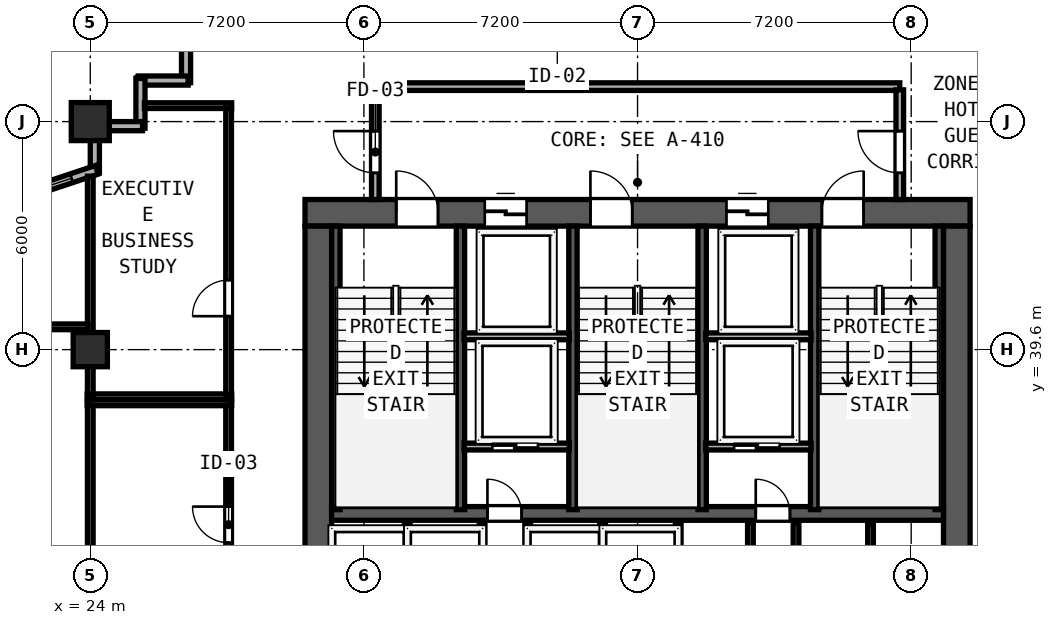
"""IFC4 building model, lengths in metres.
Left out: names, types, materials, properties, quantities, classifications, styles, units other than length and angle.
Written with IfcOpenShell. Run it as: python <this file> out.ifc"""

import sys

from ifc_helpers import new_model, si_unit, direction, frame, frame_2d, origin, origin_2d, place, context, subcontext, project, spatial, rectangle, hollow_rectangle, extrude, element, fill, save


model = new_model("IFC4")
c1 = context("Model", 3, precision=1e-05, world=origin(), true_north=direction((0.0, 1.0)))
c2 = subcontext(c1, "Body", "Model", "MODEL_VIEW")
j1 = project(units=[si_unit("LENGTHUNIT", "METRE"), si_unit("PLANEANGLEUNIT", "RADIAN")], contexts=[c1])
p1 = place(None, origin())
s1 = spatial("IfcSite", under=j1, at=p1, CompositionType="ELEMENT")
p2 = place(p1, origin())
s2 = spatial("IfcBuilding", under=s1, at=p2, CompositionType="ELEMENT")
p3 = place(p2, frame((0.0, 0.0, 98.4)))
s3 = spatial("IfcBuildingStorey", under=s2, at=p3, CompositionType="ELEMENT", Elevation=98.4)
p4 = place(p3, frame((29.65, 43.2, 0.0), z_axis=(0.0, 0.0, 1.0), x_axis=(1.0, 0.0, 0.0)))
e1 = element("IfcWall", 1, at=p4, inside=s3, PredefinedType="SHEAR", context=c2, shape_type="SweptSolid", body=[
    extrude(rectangle(XDim=17.5, YDim=0.7, at=frame_2d((8.75, 0.0))), origin(), (0.0, 0.0, 1.0), 3.6),
])
p5 = place(p4, frame((2.4, 0.0, 0.0)))
e2 = element("IfcOpeningElement", 2, at=p5, cuts=e1, PredefinedType="OPENING", context=c2, shape_type="SweptSolid", body=[
    extrude(rectangle(XDim=1.1, YDim=2.15, at=frame_2d((0.55, 1.075))), frame((0.0, 0.36, 0.0), z_axis=(0.0, -1.0, 0.0), x_axis=(1.0, 0.0, 0.0)), (0.0, 0.0, 1.0), 0.72),
])
p6 = place(p4, frame((7.51, 0.0, 0.0)))
e3 = element("IfcOpeningElement", 3, at=p6, cuts=e1, PredefinedType="OPENING", context=c2, shape_type="SweptSolid", body=[
    extrude(rectangle(XDim=1.1, YDim=2.15, at=frame_2d((0.55, 1.075))), frame((0.0, 0.36, 0.0), z_axis=(0.0, -1.0, 0.0), x_axis=(1.0, 0.0, 0.0)), (0.0, 0.0, 1.0), 0.72),
])
p7 = place(p4, frame((13.6, 0.0, 0.0)))
e4 = element("IfcOpeningElement", 4, at=p7, cuts=e1, PredefinedType="OPENING", context=c2, shape_type="SweptSolid", body=[
    extrude(rectangle(XDim=1.1, YDim=2.15, at=frame_2d((0.55, 1.075))), frame((0.0, 0.36, 0.0), z_axis=(0.0, -1.0, 0.0), x_axis=(1.0, 0.0, 0.0)), (0.0, 0.0, 1.0), 0.72),
])
p8 = place(p4, frame((4.73, 0.0, 0.0)))
e5 = element("IfcOpeningElement", 5, at=p8, cuts=e1, PredefinedType="OPENING", context=c2, shape_type="SweptSolid", body=[
    extrude(rectangle(XDim=1.1, YDim=2.2, at=frame_2d((0.55, 1.1))), frame((0.0, 0.36, 0.0), z_axis=(0.0, -1.0, 0.0), x_axis=(1.0, 0.0, 0.0)), (0.0, 0.0, 1.0), 0.72),
])
p9 = place(p4, frame((11.09, 0.0, 0.0)))
e6 = element("IfcOpeningElement", 6, at=p9, cuts=e1, PredefinedType="OPENING", context=c2, shape_type="SweptSolid", body=[
    extrude(rectangle(XDim=1.1, YDim=2.2, at=frame_2d((0.55, 1.1))), frame((0.0, 0.36, 0.0), z_axis=(0.0, -1.0, 0.0), x_axis=(1.0, 0.0, 0.0)), (0.0, 0.0, 1.0), 0.72),
])
for number, where, z_axis, x_axis in (
    (7, (30.0, 32.8, 0.0), (0.0, 0.0, 1.0), (0.0, 1.0, 0.0)),
    (8, (46.8, 32.8, 0.0), (0.0, 0.0, 1.0), (0.0, 1.0, 0.0)),
):
    element("IfcWall", number, at=place(p3, frame(where, z_axis=z_axis, x_axis=x_axis)), inside=s3, PredefinedType="SHEAR", context=c2, shape_type="SweptSolid", body=[
        extrude(rectangle(XDim=10.05, YDim=0.7, at=frame_2d((5.025, 0.0))), origin(), (0.0, 0.0, 1.0), 3.6),
    ])
p10 = place(p3, frame((30.35, 35.29, 0.0), z_axis=(0.0, 0.0, 1.0), x_axis=(1.0, 0.0, 0.0)))
e9 = element("IfcWall", 9, at=p10, inside=s3, PredefinedType="SHEAR", context=c2, shape_type="SweptSolid", body=[
    extrude(rectangle(XDim=16.1, YDim=0.36, at=frame_2d((8.05, 0.0))), origin(), (0.0, 0.0, 1.0), 3.6),
])
p11 = place(p10, frame((5.0, 0.0, 0.0), z_axis=(0.0, 0.0, 1.0), x_axis=(-1.0, 0.0, 0.0)))
e10 = element("IfcOpeningElement", 10, at=p11, cuts=e9, PredefinedType="OPENING", context=c2, shape_type="SweptSolid", body=[
    extrude(rectangle(XDim=0.9, YDim=2.1, at=frame_2d((0.45, 1.05))), frame((0.0, 0.19, 0.0), z_axis=(0.0, -1.0, 0.0), x_axis=(1.0, 0.0, 0.0)), (0.0, 0.0, 1.0), 0.38),
])
p12 = place(p10, frame((12.06, 0.0, 0.0), z_axis=(0.0, 0.0, 1.0), x_axis=(-1.0, 0.0, 0.0)))
e11 = element("IfcOpeningElement", 11, at=p12, cuts=e9, PredefinedType="OPENING", context=c2, shape_type="SweptSolid", body=[
    extrude(rectangle(XDim=0.9, YDim=2.1, at=frame_2d((0.45, 1.05))), frame((0.0, 0.19, 0.0), z_axis=(0.0, -1.0, 0.0), x_axis=(1.0, 0.0, 0.0)), (0.0, 0.0, 1.0), 0.38),
])
for number, where, z_axis, x_axis in (
    (12, (30.462, 35.39, 0.0), (0.0, 0.0, 1.0), (0.0, 1.0, 0.0)),
    (13, (33.74, 35.39, 0.0), (0.0, 0.0, 1.0), (0.0, 1.0, 0.0)),
    (14, (36.7, 35.39, 0.0), (0.0, 0.0, 1.0), (0.0, 1.0, 0.0)),
    (15, (40.1, 35.39, 0.0), (0.0, 0.0, 1.0), (0.0, 1.0, 0.0)),
    (16, (43.06, 35.39, 0.0), (0.0, 0.0, 1.0), (0.0, 1.0, 0.0)),
    (17, (46.338, 35.39, 0.0), (0.0, 0.0, 1.0), (0.0, 1.0, 0.0)),
):
    element("IfcWall", number, at=place(p3, frame(where, z_axis=z_axis, x_axis=x_axis)), inside=s3, PredefinedType="SHEAR", context=c2, shape_type="SweptSolid", body=[
        extrude(rectangle(XDim=7.46, YDim=0.22, at=frame_2d((3.73, 0.0))), origin(), (0.0, 0.0, 1.0), 3.6),
    ])
p13 = place(p3, frame((24.0, 45.6, 0.0), z_axis=(0.0, 0.0, 1.0), x_axis=(1.0, 0.0, 0.0)))
e18 = element("IfcColumn", 18, at=p13, inside=s3, PredefinedType="COLUMN", context=c2, shape_type="SweptSolid", body=[
    extrude(hollow_rectangle(XDim=1.0, YDim=1.0, WallThickness=0.038, at=origin_2d()), origin(), (0.0, 0.0, 1.0), 3.8),
])
p14 = place(p3, frame((24.0, 39.6, 0.0), z_axis=(0.0, 0.0, 1.0), x_axis=(1.0, 0.0, 0.0)))
e19 = element("IfcColumn", 19, at=p14, inside=s3, PredefinedType="COLUMN", context=c2, shape_type="SweptSolid", body=[
    extrude(hollow_rectangle(XDim=0.9, YDim=0.9, WallThickness=0.034, at=origin_2d()), origin(), (0.0, 0.0, 1.0), 3.8),
])
p15 = place(p3, frame((26.52, 47.995, 0.0), z_axis=(0.0, 0.0, 1.0), x_axis=(0.0, -1.0, 0.0)))
e20 = element("IfcWall", 20, at=p15, inside=s3, PredefinedType="SOLIDWALL", context=c2, shape_type="SweptSolid", body=[
    extrude(rectangle(XDim=1.37, YDim=0.24, at=frame_2d((0.685, 0.0))), origin(), (0.0, 0.0, 1.0), 3.6),
])
for number, where, z_axis, x_axis in (
    (21, (26.575, 46.68, 0.0), (0.0, 0.0, 1.0), (-1.0, 0.0, 0.0)),
    (22, (25.32, 46.735, 0.0), (0.0, 0.0, 1.0), (0.0, -1.0, 0.0)),
):
    element("IfcWall", number, at=place(p3, frame(where, z_axis=z_axis, x_axis=x_axis)), inside=s3, PredefinedType="SOLIDWALL", context=c2, shape_type="SweptSolid", body=[
        extrude(rectangle(XDim=1.31, YDim=0.24, at=frame_2d((0.655, 0.0))), origin(), (0.0, 0.0, 1.0), 3.6),
    ])
p16 = place(p3, frame((25.375, 45.48, 0.0), z_axis=(0.0, 0.0, 1.0), x_axis=(-1.0, 0.0, 0.0)))
e23 = element("IfcWall", 23, at=p16, inside=s3, PredefinedType="SOLIDWALL", context=c2, shape_type="SweptSolid", body=[
    extrude(rectangle(XDim=0.883, YDim=0.24, at=frame_2d((0.441, 0.0))), origin(), (0.0, 0.0, 1.0), 3.6),
])
p17 = place(p3, frame((24.12, 45.108, 0.0), z_axis=(0.0, 0.0, 1.0), x_axis=(0.0, -1.0, 0.0)))
e24 = element("IfcWall", 24, at=p17, inside=s3, PredefinedType="SOLIDWALL", context=c2, shape_type="SweptSolid", body=[
    extrude(rectangle(XDim=0.849, YDim=0.24, at=frame_2d((0.425, 0.0))), origin(), (0.0, 0.0, 1.0), 3.145),
])
p18 = place(p3, frame((24.172, 44.331, 0.0), z_axis=(0.0, 0.0, 1.0), x_axis=(-0.948683298051, -0.316227766017, 0.0)))
e25 = element("IfcWall", 25, at=p18, inside=s3, PredefinedType="SOLIDWALL", context=c2, shape_type="SweptSolid", body=[
    extrude(rectangle(XDim=5.973, YDim=0.24, at=frame_2d((2.987, 0.0))), origin(), (0.0, 0.0, 1.0), 3.145),
])
p19 = place(p18, frame((0.7, 0.0, 0.85)))
e26 = element("IfcOpeningElement", 26, at=p19, cuts=e25, PredefinedType="OPENING", context=c2, shape_type="SweptSolid", body=[
    extrude(rectangle(XDim=1.15, YDim=1.8, at=frame_2d((0.575, 0.9))), frame((0.0, 0.13, 0.0), z_axis=(0.0, -1.0, 0.0), x_axis=(1.0, 0.0, 0.0)), (0.0, 0.0, 1.0), 0.26),
])
p20 = place(p3, frame((31.5, 46.52, 0.0), z_axis=(0.0, 0.0, 1.0), x_axis=(1.0, 0.0, 0.0)))
e27 = element("IfcWall", 27, at=p20, inside=s3, PredefinedType="SOLIDWALL", context=c2, shape_type="SweptSolid", body=[
    extrude(rectangle(XDim=13.8, YDim=0.2, at=frame_2d((6.9, 0.0))), origin(), (0.0, 0.0, 1.0), 3.6),
])
p21 = place(p3, frame((31.5, 43.55, 0.0), z_axis=(0.0, 0.0, 1.0), x_axis=(0.0, 1.0, 0.0)))
e28 = element("IfcWall", 28, at=p21, inside=s3, PredefinedType="SOLIDWALL", context=c2, shape_type="SweptSolid", body=[
    extrude(rectangle(XDim=2.885, YDim=0.2, at=frame_2d((1.442, 0.0))), origin(), (0.0, 0.0, 1.0), 3.6),
])
p22 = place(p21, frame((1.8, 0.0, 0.0), z_axis=(0.0, 0.0, 1.0), x_axis=(-1.0, 0.0, 0.0)))
e29 = element("IfcOpeningElement", 29, at=p22, cuts=e28, PredefinedType="OPENING", context=c2, shape_type="SweptSolid", body=[
    extrude(rectangle(XDim=1.1, YDim=2.15, at=frame_2d((0.55, 1.075))), frame((0.0, 0.11, 0.0), z_axis=(0.0, -1.0, 0.0), x_axis=(1.0, 0.0, 0.0)), (0.0, 0.0, 1.0), 0.22),
])
p23 = place(p3, frame((45.3, 43.55, 0.0), z_axis=(0.0, 0.0, 1.0), x_axis=(0.0, 1.0, 0.0)))
e30 = element("IfcWall", 30, at=p23, inside=s3, PredefinedType="SOLIDWALL", context=c2, shape_type="SweptSolid", body=[
    extrude(rectangle(XDim=2.885, YDim=0.2, at=frame_2d((1.442, 0.0))), origin(), (0.0, 0.0, 1.0), 3.6),
])
p24 = place(p23, frame((0.7, 0.0, 0.0)))
e31 = element("IfcOpeningElement", 31, at=p24, cuts=e30, PredefinedType="OPENING", context=c2, shape_type="SweptSolid", body=[
    extrude(rectangle(XDim=1.1, YDim=2.15, at=frame_2d((0.55, 1.075))), frame((0.0, 0.11, 0.0), z_axis=(0.0, -1.0, 0.0), x_axis=(1.0, 0.0, 0.0)), (0.0, 0.0, 1.0), 0.22),
])
for number, where, z_axis, x_axis in (
    (32, (33.835, 39.95, 0.0), (0.0, 0.0, 1.0), (1.0, 0.0, 0.0)),
    (33, (40.195, 39.95, 0.0), (0.0, 0.0, 1.0), (1.0, 0.0, 0.0)),
):
    element("IfcWall", number, at=place(p3, frame(where, z_axis=z_axis, x_axis=x_axis)), inside=s3, PredefinedType="SOLIDWALL", context=c2, shape_type="SweptSolid", body=[
        extrude(rectangle(XDim=2.77, YDim=0.18, at=frame_2d((1.385, 0.0))), origin(), (0.0, 0.0, 1.0), 3.6),
    ])
p25 = place(p3, frame((33.835, 37.05, 0.0), z_axis=(0.0, 0.0, 1.0), x_axis=(1.0, 0.0, 0.0)))
e34 = element("IfcWall", 34, at=p25, inside=s3, PredefinedType="SOLIDWALL", context=c2, shape_type="SweptSolid", body=[
    extrude(rectangle(XDim=2.77, YDim=0.18, at=frame_2d((1.385, 0.0))), origin(), (0.0, 0.0, 1.0), 3.6),
])
p26 = place(p25, frame((1.945, 0.0, 0.0), z_axis=(0.0, 0.0, 1.0), x_axis=(-1.0, 0.0, 0.0)))
e35 = element("IfcOpeningElement", 35, at=p26, cuts=e34, PredefinedType="OPENING", context=c2, shape_type="SweptSolid", body=[
    extrude(rectangle(XDim=1.2, YDim=2.2, at=frame_2d((0.6, 1.1))), frame((0.0, 0.1, 0.0), z_axis=(0.0, -1.0, 0.0), x_axis=(1.0, 0.0, 0.0)), (0.0, 0.0, 1.0), 0.2),
])
for number, where, z_axis, x_axis in (
    (36, (34.31, 32.88, 0.0), (0.0, 0.0, 1.0), (0.0, 1.0, 0.0)),
    (37, (35.51, 32.88, 0.0), (0.0, 0.0, 1.0), (0.0, 1.0, 0.0)),
):
    element("IfcWall", number, at=place(p3, frame(where, z_axis=z_axis, x_axis=x_axis)), inside=s3, PredefinedType="SOLIDWALL", context=c2, shape_type="SweptSolid", body=[
        extrude(rectangle(XDim=2.17, YDim=0.15, at=frame_2d((1.085, 0.0))), origin(), (0.0, 0.0, 1.0), 3.6),
    ])
p27 = place(p3, frame((40.195, 37.05, 0.0), z_axis=(0.0, 0.0, 1.0), x_axis=(1.0, 0.0, 0.0)))
e38 = element("IfcWall", 38, at=p27, inside=s3, PredefinedType="SOLIDWALL", context=c2, shape_type="SweptSolid", body=[
    extrude(rectangle(XDim=2.77, YDim=0.18, at=frame_2d((1.385, 0.0))), origin(), (0.0, 0.0, 1.0), 3.6),
])
p28 = place(p27, frame((1.945, 0.0, 0.0), z_axis=(0.0, 0.0, 1.0), x_axis=(-1.0, 0.0, 0.0)))
e39 = element("IfcOpeningElement", 39, at=p28, cuts=e38, PredefinedType="OPENING", context=c2, shape_type="SweptSolid", body=[
    extrude(rectangle(XDim=1.2, YDim=2.2, at=frame_2d((0.6, 1.1))), frame((0.0, 0.1, 0.0), z_axis=(0.0, -1.0, 0.0), x_axis=(1.0, 0.0, 0.0)), (0.0, 0.0, 1.0), 0.2),
])
for number, where, z_axis, x_axis in (
    (40, (41.37, 32.88, 0.0), (0.0, 0.0, 1.0), (0.0, 1.0, 0.0)),
    (41, (42.57, 32.88, 0.0), (0.0, 0.0, 1.0), (0.0, 1.0, 0.0)),
):
    element("IfcWall", number, at=place(p3, frame(where, z_axis=z_axis, x_axis=x_axis)), inside=s3, PredefinedType="SOLIDWALL", context=c2, shape_type="SweptSolid", body=[
        extrude(rectangle(XDim=2.17, YDim=0.15, at=frame_2d((1.085, 0.0))), origin(), (0.0, 0.0, 1.0), 3.6),
    ])
for number, where, z_axis, x_axis in (
    (42, (32.34, 32.95, 0.0), (0.0, 0.0, 1.0), (0.0, 1.0, 0.0)),
    (43, (37.48, 32.95, 0.0), (0.0, 0.0, 1.0), (0.0, 1.0, 0.0)),
    (44, (39.47, 32.95, 0.0), (0.0, 0.0, 1.0), (0.0, 1.0, 0.0)),
    (45, (44.53, 32.95, 0.0), (0.0, 0.0, 1.0), (0.0, 1.0, 0.0)),
):
    element("IfcWall", number, at=place(p3, frame(where, z_axis=z_axis, x_axis=x_axis)), inside=s3, PredefinedType="SOLIDWALL", context=c2, shape_type="SweptSolid", body=[
        extrude(rectangle(XDim=2.05, YDim=0.15, at=frame_2d((1.025, 0.0))), origin(), (0.0, 0.0, 1.0), 3.6),
    ])
p29 = place(p3, frame((23.92, 38.2, 0.0), z_axis=(0.0, 0.0, 1.0), x_axis=(1.0, 0.0, 0.0)))
e46 = element("IfcWall", 46, at=p29, inside=s3, PredefinedType="PARTITIONING", context=c2, shape_type="SweptSolid", body=[
    extrude(rectangle(XDim=3.8, YDim=0.15, at=frame_2d((1.9, 0.0))), origin(), (0.0, 0.0, 1.0), 3.6),
])
p30 = place(p3, frame((24.0, 33.06, 0.0), z_axis=(0.0, 0.0, 1.0), x_axis=(0.0, 1.0, 0.0)))
e47 = element("IfcWall", 47, at=p30, inside=s3, PredefinedType="PARTITIONING", context=c2, shape_type="SweptSolid", body=[
    extrude(rectangle(XDim=5.08, YDim=0.15, at=frame_2d((2.54, 0.0))), origin(), (0.0, 0.0, 1.0), 3.145),
])
p31 = place(p3, frame((27.64, 33.06, 0.0), z_axis=(0.0, 0.0, 1.0), x_axis=(0.0, 1.0, 0.0)))
e48 = element("IfcWall", 48, at=p31, inside=s3, PredefinedType="PARTITIONING", context=c2, shape_type="SweptSolid", body=[
    extrude(rectangle(XDim=5.08, YDim=0.15, at=frame_2d((2.54, 0.0))), origin(), (0.0, 0.0, 1.0), 3.6),
])
p32 = place(p31, frame((2.41, 0.0, 0.0), z_axis=(0.0, 0.0, 1.0), x_axis=(-1.0, 0.0, 0.0)))
e49 = element("IfcOpeningElement", 49, at=p32, cuts=e48, PredefinedType="OPENING", context=c2, shape_type="SweptSolid", body=[
    extrude(rectangle(XDim=0.95, YDim=2.12, at=frame_2d((0.475, 1.06))), frame((0.0, 0.085, 0.0), z_axis=(0.0, -1.0, 0.0), x_axis=(1.0, 0.0, 0.0)), (0.0, 0.0, 1.0), 0.17),
])
p33 = place(p3, frame((25.425, 46.02, 0.0), z_axis=(0.0, 0.0, 1.0), x_axis=(1.0, 0.0, 0.0)))
e50 = element("IfcWall", 50, at=p33, inside=s3, PredefinedType="PARTITIONING", context=c2, shape_type="SweptSolid", body=[
    extrude(rectangle(XDim=2.295, YDim=0.15, at=frame_2d((1.147, 0.0))), origin(), (0.0, 0.0, 1.0), 3.6),
])
p34 = place(p3, frame((23.92, 38.36, 0.0), z_axis=(0.0, 0.0, 1.0), x_axis=(1.0, 0.0, 0.0)))
e51 = element("IfcWall", 51, at=p34, inside=s3, PredefinedType="PARTITIONING", context=c2, shape_type="SweptSolid", body=[
    extrude(rectangle(XDim=3.8, YDim=0.15, at=frame_2d((1.9, 0.0))), origin(), (0.0, 0.0, 1.0), 3.6),
])
p35 = place(p3, frame((24.0, 38.42, 0.0), z_axis=(0.0, 0.0, 1.0), x_axis=(0.0, 1.0, 0.0)))
e52 = element("IfcWall", 52, at=p35, inside=s3, PredefinedType="PARTITIONING", context=c2, shape_type="SweptSolid", body=[
    extrude(rectangle(XDim=5.743, YDim=0.15, at=frame_2d((2.872, 0.0))), origin(), (0.0, 0.0, 1.0), 3.145),
])
p36 = place(p3, frame((27.64, 38.42, 0.0), z_axis=(0.0, 0.0, 1.0), x_axis=(0.0, 1.0, 0.0)))
e53 = element("IfcWall", 53, at=p36, inside=s3, PredefinedType="PARTITIONING", context=c2, shape_type="SweptSolid", body=[
    extrude(rectangle(XDim=7.54, YDim=0.15, at=frame_2d((3.77, 0.0))), origin(), (0.0, 0.0, 1.0), 3.6),
])
p37 = place(p36, frame((3.01, 0.0, 0.0), z_axis=(0.0, 0.0, 1.0), x_axis=(-1.0, 0.0, 0.0)))
e54 = element("IfcOpeningElement", 54, at=p37, cuts=e53, PredefinedType="OPENING", context=c2, shape_type="SweptSolid", body=[
    extrude(rectangle(XDim=0.95, YDim=2.12, at=frame_2d((0.475, 1.06))), frame((0.0, 0.085, 0.0), z_axis=(0.0, -1.0, 0.0), x_axis=(1.0, 0.0, 0.0)), (0.0, 0.0, 1.0), 0.17),
])
p38 = place(p3, frame((20.5, 40.2, 0.0), z_axis=(0.0, 0.0, 1.0), x_axis=(1.0, 0.0, 0.0)))
e55 = element("IfcWall", 55, at=p38, inside=s3, PredefinedType="PARTITIONING", context=c2, shape_type="SweptSolid", body=[
    extrude(rectangle(XDim=3.44, YDim=0.15, at=frame_2d((1.72, 0.0))), origin(), (0.0, 0.0, 1.0), 3.6),
])
p39 = place(p19, origin())
e56 = element("IfcWindow", 56, at=p39, inside=s3, PartitioningType="SINGLE_PANEL", PredefinedType="WINDOW", context=c2, shape_type="SweptSolid", body=[
    extrude(rectangle(XDim=1.15, YDim=1.8, at=frame_2d((0.575, 0.9))), frame((0.0, 0.03, 0.0), z_axis=(0.0, -1.0, 0.0), x_axis=(1.0, 0.0, 0.0)), (0.0, 0.0, 1.0), 0.06),
])
fill(e26, e56)
p40 = place(p5, origin())
e57 = element("IfcDoor", 57, at=p40, inside=s3, OperationType="SINGLE_SWING_LEFT", PredefinedType="DOOR", context=c2, shape_type="SweptSolid", body=[
    extrude(rectangle(XDim=1.1, YDim=2.15, at=frame_2d((0.55, 1.075))), frame((0.0, 0.185, 0.0), z_axis=(0.0, -1.0, 0.0), x_axis=(1.0, 0.0, 0.0)), (0.0, 0.0, 1.0), 0.05),
])
fill(e2, e57)
p41 = place(p6, origin())
e58 = element("IfcDoor", 58, at=p41, inside=s3, OperationType="SINGLE_SWING_LEFT", PredefinedType="DOOR", context=c2, shape_type="SweptSolid", body=[
    extrude(rectangle(XDim=1.1, YDim=2.15, at=frame_2d((0.55, 1.075))), frame((0.0, 0.185, 0.0), z_axis=(0.0, -1.0, 0.0), x_axis=(1.0, 0.0, 0.0)), (0.0, 0.0, 1.0), 0.05),
])
fill(e3, e58)
p42 = place(p7, origin())
e59 = element("IfcDoor", 59, at=p42, inside=s3, OperationType="SINGLE_SWING_RIGHT", PredefinedType="DOOR", context=c2, shape_type="SweptSolid", body=[
    extrude(rectangle(XDim=1.1, YDim=2.15, at=frame_2d((0.55, 1.075))), frame((0.0, 0.185, 0.0), z_axis=(0.0, -1.0, 0.0), x_axis=(1.0, 0.0, 0.0)), (0.0, 0.0, 1.0), 0.05),
])
fill(e4, e59)
p43 = place(p22, origin())
e60 = element("IfcDoor", 60, at=p43, inside=s3, OperationType="SINGLE_SWING_LEFT", PredefinedType="DOOR", context=c2, shape_type="SweptSolid", body=[
    extrude(rectangle(XDim=1.1, YDim=2.15, at=frame_2d((0.55, 1.075))), frame((0.0, 0.025, 0.0), z_axis=(0.0, -1.0, 0.0), x_axis=(1.0, 0.0, 0.0)), (0.0, 0.0, 1.0), 0.05),
])
fill(e29, e60)
p44 = place(p24, origin())
e61 = element("IfcDoor", 61, at=p44, inside=s3, OperationType="SINGLE_SWING_RIGHT", PredefinedType="DOOR", context=c2, shape_type="SweptSolid", body=[
    extrude(rectangle(XDim=1.1, YDim=2.15, at=frame_2d((0.55, 1.075))), frame((0.0, 0.025, 0.0), z_axis=(0.0, -1.0, 0.0), x_axis=(1.0, 0.0, 0.0)), (0.0, 0.0, 1.0), 0.05),
])
fill(e31, e61)
p45 = place(p8, origin())
e62 = element("IfcDoor", 62, at=p45, inside=s3, OperationType="SLIDING_TO_LEFT", PredefinedType="DOOR", context=c2, shape_type="SweptSolid", body=[
    extrude(rectangle(XDim=1.1, YDim=2.2, at=frame_2d((0.55, 1.1))), frame((0.0, 0.185, 0.0), z_axis=(0.0, -1.0, 0.0), x_axis=(1.0, 0.0, 0.0)), (0.0, 0.0, 1.0), 0.05),
])
fill(e5, e62)
p46 = place(p9, origin())
e63 = element("IfcDoor", 63, at=p46, inside=s3, OperationType="SLIDING_TO_LEFT", PredefinedType="DOOR", context=c2, shape_type="SweptSolid", body=[
    extrude(rectangle(XDim=1.1, YDim=2.2, at=frame_2d((0.55, 1.1))), frame((0.0, 0.185, 0.0), z_axis=(0.0, -1.0, 0.0), x_axis=(1.0, 0.0, 0.0)), (0.0, 0.0, 1.0), 0.05),
])
fill(e6, e63)
p47 = place(p26, origin())
e64 = element("IfcDoor", 64, at=p47, inside=s3, OperationType="SLIDING_TO_RIGHT", PredefinedType="DOOR", context=c2, shape_type="SweptSolid", body=[
    extrude(rectangle(XDim=1.2, YDim=2.2, at=frame_2d((0.6, 1.1))), frame((0.0, 0.025, 0.0), z_axis=(0.0, -1.0, 0.0), x_axis=(1.0, 0.0, 0.0)), (0.0, 0.0, 1.0), 0.05),
])
fill(e35, e64)
p48 = place(p11, origin())
e65 = element("IfcDoor", 65, at=p48, inside=s3, OperationType="SINGLE_SWING_RIGHT", PredefinedType="DOOR", context=c2, shape_type="SweptSolid", body=[
    extrude(rectangle(XDim=0.9, YDim=2.1, at=frame_2d((0.45, 1.05))), frame((0.0, 0.025, 0.0), z_axis=(0.0, -1.0, 0.0), x_axis=(1.0, 0.0, 0.0)), (0.0, 0.0, 1.0), 0.05),
])
fill(e10, e65)
p49 = place(p28, origin())
e66 = element("IfcDoor", 66, at=p49, inside=s3, OperationType="SLIDING_TO_RIGHT", PredefinedType="DOOR", context=c2, shape_type="SweptSolid", body=[
    extrude(rectangle(XDim=1.2, YDim=2.2, at=frame_2d((0.6, 1.1))), frame((0.0, 0.025, 0.0), z_axis=(0.0, -1.0, 0.0), x_axis=(1.0, 0.0, 0.0)), (0.0, 0.0, 1.0), 0.05),
])
fill(e39, e66)
p50 = place(p12, origin())
e67 = element("IfcDoor", 67, at=p50, inside=s3, OperationType="SINGLE_SWING_RIGHT", PredefinedType="DOOR", context=c2, shape_type="SweptSolid", body=[
    extrude(rectangle(XDim=0.9, YDim=2.1, at=frame_2d((0.45, 1.05))), frame((0.0, 0.025, 0.0), z_axis=(0.0, -1.0, 0.0), x_axis=(1.0, 0.0, 0.0)), (0.0, 0.0, 1.0), 0.05),
])
fill(e11, e67)
p51 = place(p32, origin())
e68 = element("IfcDoor", 68, at=p51, inside=s3, OperationType="SINGLE_SWING_LEFT", PredefinedType="DOOR", context=c2, shape_type="SweptSolid", body=[
    extrude(rectangle(XDim=0.95, YDim=2.12, at=frame_2d((0.475, 1.06))), frame((0.0, 0.025, 0.0), z_axis=(0.0, -1.0, 0.0), x_axis=(1.0, 0.0, 0.0)), (0.0, 0.0, 1.0), 0.05),
])
fill(e49, e68)
p52 = place(p37, origin())
e69 = element("IfcDoor", 69, at=p52, inside=s3, OperationType="SINGLE_SWING_RIGHT", PredefinedType="DOOR", context=c2, shape_type="SweptSolid", body=[
    extrude(rectangle(XDim=0.95, YDim=2.12, at=frame_2d((0.475, 1.06))), frame((0.0, 0.025, 0.0), z_axis=(0.0, -1.0, 0.0), x_axis=(1.0, 0.0, 0.0)), (0.0, 0.0, 1.0), 0.05),
])
fill(e54, e69)
save(model, sys.argv[1])
